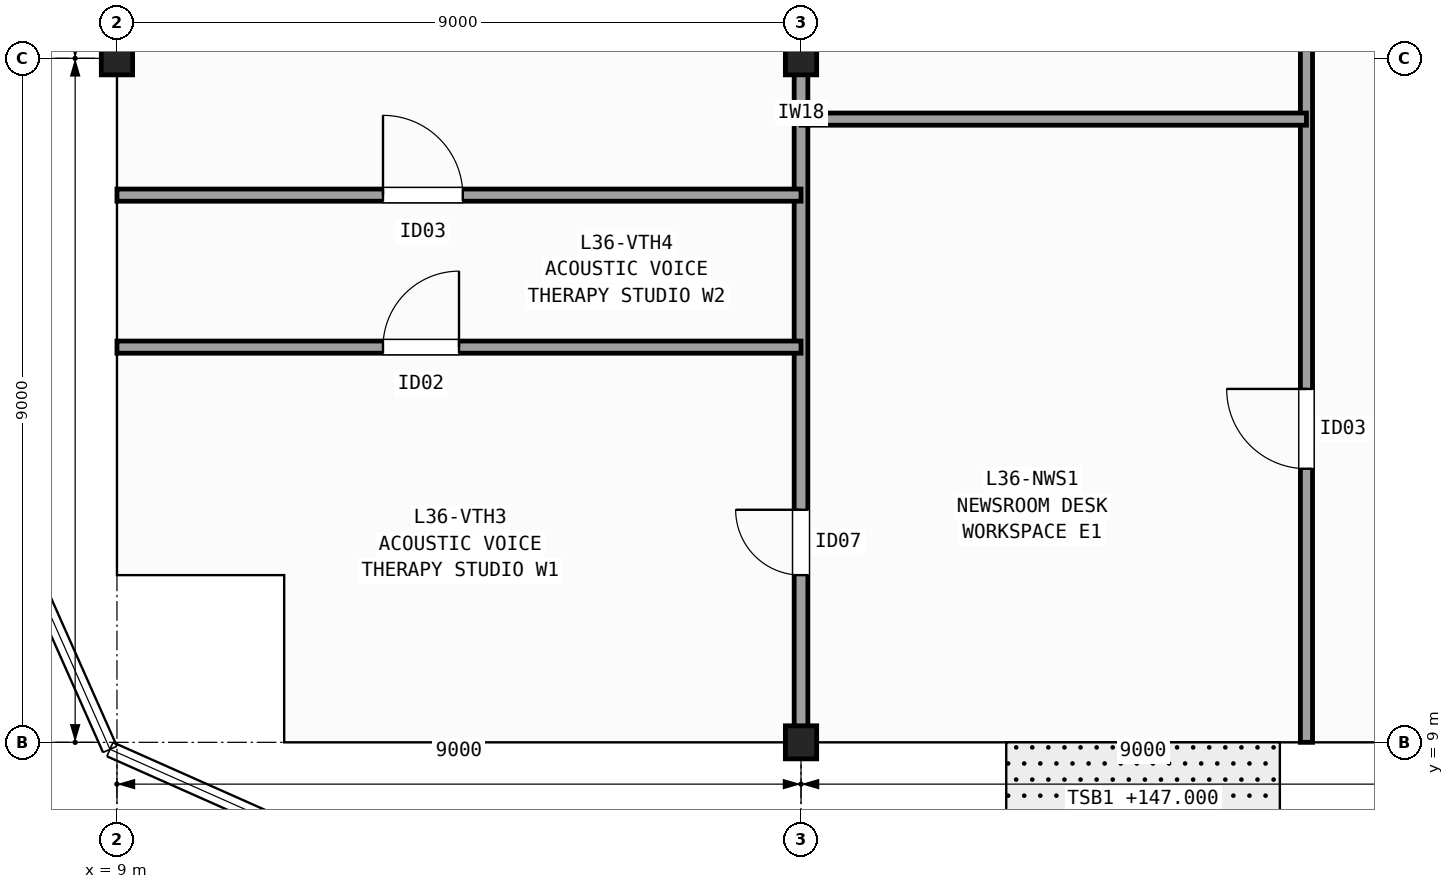
"""IFC4 building model, lengths in metres.
Left out: names, types, materials, properties, quantities, classifications, styles, units other than length and angle.
Written with IfcOpenShell. Run it as: python <this file> out.ifc"""

import sys

from ifc_helpers import new_model, si_unit, direction, frame, frame_2d, origin, origin_2d, place, context, subcontext, project, spatial, rectangle, i_section, extrude, element, fill, save


model = new_model("IFC4")
c1 = context("Model", 3, precision=1e-05, world=origin(), true_north=direction((0.0, 1.0)))
c2 = subcontext(c1, "Body", "Model", "MODEL_VIEW")
j1 = project(units=[si_unit("LENGTHUNIT", "METRE"), si_unit("PLANEANGLEUNIT", "RADIAN")], contexts=[c1])
p1 = place(None, origin())
s1 = spatial("IfcSite", under=j1, at=p1, CompositionType="ELEMENT")
p2 = place(p1, origin())
s2 = spatial("IfcBuilding", under=s1, at=p2, CompositionType="ELEMENT")
p3 = place(p2, frame((0.0, 0.0, 147.0)))
s3 = spatial("IfcBuildingStorey", under=s2, at=p3, CompositionType="ELEMENT", Elevation=147.0)
for number, where, z_axis, x_axis in (
    (1, (9.0, 18.0, 0.0), (0.0, 0.0, 1.0), (1.0, 0.0, 0.0)),
    (2, (18.0, 9.0, 0.0), (0.0, 0.0, 1.0), (1.0, 0.0, 0.0)),
    (3, (18.0, 18.0, 0.0), (0.0, 0.0, 1.0), (1.0, 0.0, 0.0)),
):
    element("IfcColumn", number, at=place(p3, frame(where, z_axis=z_axis, x_axis=x_axis)), inside=s3, PredefinedType="COLUMN", context=c2, shape_type="SweptSolid", body=[
        extrude(i_section(OverallWidth=0.412, OverallDepth=0.435, WebThickness=0.036, FlangeThickness=0.057, FilletRadius=0.015, at=origin_2d()), origin(), (0.0, 0.0, 1.0), 3.7),
    ])
p4 = place(p3, frame((24.65, 9.0, 0.0), z_axis=(0.0, 0.0, 1.0), x_axis=(0.0, 1.0, 0.0)))
e4 = element("IfcWall", 4, at=p4, inside=s3, PredefinedType="PARTITIONING", context=c2, shape_type="SweptSolid", body=[
    extrude(rectangle(XDim=19.2, YDim=0.16, at=frame_2d((9.6, 0.0))), origin(), (0.0, 0.0, 1.0), 2.634),
])
p5 = place(p4, frame((3.6, 0.0, 0.0)))
e5 = element("IfcOpeningElement", 5, at=p5, cuts=e4, PredefinedType="OPENING", context=c2, shape_type="SweptSolid", body=[
    extrude(rectangle(XDim=1.05, YDim=2.15, at=frame_2d((0.525, 1.075))), frame((0.0, 0.09, 0.0), z_axis=(0.0, -1.0, 0.0), x_axis=(1.0, 0.0, 0.0)), (0.0, 0.0, 1.0), 0.18),
])
p6 = place(p4, frame((13.165, 0.0, 0.0)))
e6 = element("IfcOpeningElement", 6, at=p6, cuts=e4, PredefinedType="OPENING", context=c2, shape_type="SweptSolid", body=[
    extrude(rectangle(XDim=1.2, YDim=2.15, at=frame_2d((0.6, 1.075))), frame((0.0, 0.09, 0.0), z_axis=(0.0, -1.0, 0.0), x_axis=(1.0, 0.0, 0.0)), (0.0, 0.0, 1.0), 0.18),
])
p7 = place(p3, frame((18.0, 9.0, 0.0), z_axis=(0.0, 0.0, 1.0), x_axis=(0.0, 1.0, 0.0)))
e7 = element("IfcWall", 7, at=p7, inside=s3, PredefinedType="PARTITIONING", context=c2, shape_type="SweptSolid", body=[
    extrude(rectangle(XDim=19.13, YDim=0.18, at=frame_2d((9.565, 0.0))), origin(), (0.0, 0.0, 1.0), 2.634),
])
p8 = place(p7, frame((2.2, 0.0, 0.0)))
e8 = element("IfcOpeningElement", 8, at=p8, cuts=e7, PredefinedType="OPENING", context=c2, shape_type="SweptSolid", body=[
    extrude(rectangle(XDim=0.86, YDim=2.05, at=frame_2d((0.43, 1.025))), frame((0.0, 0.1, 0.0), z_axis=(0.0, -1.0, 0.0), x_axis=(1.0, 0.0, 0.0)), (0.0, 0.0, 1.0), 0.2),
])
p9 = place(p7, frame((13.5, 0.0, 0.0)))
e9 = element("IfcOpeningElement", 9, at=p9, cuts=e7, PredefinedType="OPENING", context=c2, shape_type="SweptSolid", body=[
    extrude(rectangle(XDim=0.95, YDim=2.1, at=frame_2d((0.475, 1.05))), frame((0.0, 0.1, 0.0), z_axis=(0.0, -1.0, 0.0), x_axis=(1.0, 0.0, 0.0)), (0.0, 0.0, 1.0), 0.2),
])
p10 = place(p3, frame((18.0, 17.2, 0.0), z_axis=(0.0, 0.0, 1.0), x_axis=(1.0, 0.0, 0.0)))
e10 = element("IfcWall", 10, at=p10, inside=s3, PredefinedType="PARTITIONING", context=c2, shape_type="SweptSolid", body=[
    extrude(rectangle(XDim=6.65, YDim=0.16, at=frame_2d((3.325, 0.0))), origin(), (0.0, 0.0, 1.0), 2.789),
])
p11 = place(p3, frame((9.0, 14.2, 0.0), z_axis=(0.0, 0.0, 1.0), x_axis=(1.0, 0.0, 0.0)))
e11 = element("IfcWall", 11, at=p11, inside=s3, PredefinedType="PARTITIONING", context=c2, shape_type="SweptSolid", body=[
    extrude(rectangle(XDim=9.0, YDim=0.16, at=frame_2d((4.5, 0.0))), origin(), (0.0, 0.0, 1.0), 2.792),
])
p12 = place(p11, frame((3.5, 0.0, 0.0)))
e12 = element("IfcOpeningElement", 12, at=p12, cuts=e11, PredefinedType="OPENING", context=c2, shape_type="SweptSolid", body=[
    extrude(rectangle(XDim=1.0, YDim=2.1, at=frame_2d((0.5, 1.05))), frame((0.0, 0.09, 0.0), z_axis=(0.0, -1.0, 0.0), x_axis=(1.0, 0.0, 0.0)), (0.0, 0.0, 1.0), 0.18),
])
p13 = place(p3, frame((9.0, 16.2, 0.0), z_axis=(0.0, 0.0, 1.0), x_axis=(1.0, 0.0, 0.0)))
e13 = element("IfcWall", 13, at=p13, inside=s3, PredefinedType="PARTITIONING", context=c2, shape_type="SweptSolid", body=[
    extrude(rectangle(XDim=9.0, YDim=0.16, at=frame_2d((4.5, 0.0))), origin(), (0.0, 0.0, 1.0), 2.792),
])
p14 = place(p13, frame((3.5, 0.0, 0.0)))
e14 = element("IfcOpeningElement", 14, at=p14, cuts=e13, PredefinedType="OPENING", context=c2, shape_type="SweptSolid", body=[
    extrude(rectangle(XDim=1.05, YDim=2.15, at=frame_2d((0.525, 1.075))), frame((0.0, 0.09, 0.0), z_axis=(0.0, -1.0, 0.0), x_axis=(1.0, 0.0, 0.0)), (0.0, 0.0, 1.0), 0.18),
])
p15 = place(p5, origin())
e15 = element("IfcDoor", 15, at=p15, inside=s3, OperationType="SINGLE_SWING_RIGHT", PredefinedType="DOOR", context=c2, shape_type="SweptSolid", body=[
    extrude(rectangle(XDim=1.05, YDim=2.15, at=frame_2d((0.525, 1.075))), frame((0.0, 0.025, 0.0), z_axis=(0.0, -1.0, 0.0), x_axis=(1.0, 0.0, 0.0)), (0.0, 0.0, 1.0), 0.05),
])
fill(e5, e15)
p16 = place(p8, origin())
e16 = element("IfcDoor", 16, at=p16, inside=s3, OperationType="SINGLE_SWING_RIGHT", PredefinedType="DOOR", context=c2, shape_type="SweptSolid", body=[
    extrude(rectangle(XDim=0.86, YDim=2.05, at=frame_2d((0.43, 1.025))), frame((0.0, 0.025, 0.0), z_axis=(0.0, -1.0, 0.0), x_axis=(1.0, 0.0, 0.0)), (0.0, 0.0, 1.0), 0.05),
])
fill(e8, e16)
p17 = place(p12, origin())
e17 = element("IfcDoor", 17, at=p17, inside=s3, OperationType="SINGLE_SWING_RIGHT", PredefinedType="DOOR", context=c2, shape_type="SweptSolid", body=[
    extrude(rectangle(XDim=1.0, YDim=2.1, at=frame_2d((0.5, 1.05))), frame((0.0, 0.025, 0.0), z_axis=(0.0, -1.0, 0.0), x_axis=(1.0, 0.0, 0.0)), (0.0, 0.0, 1.0), 0.05),
])
fill(e12, e17)
p18 = place(p14, origin())
e18 = element("IfcDoor", 18, at=p18, inside=s3, OperationType="SINGLE_SWING_LEFT", PredefinedType="DOOR", context=c2, shape_type="SweptSolid", body=[
    extrude(rectangle(XDim=1.05, YDim=2.15, at=frame_2d((0.525, 1.075))), frame((0.0, 0.025, 0.0), z_axis=(0.0, -1.0, 0.0), x_axis=(1.0, 0.0, 0.0)), (0.0, 0.0, 1.0), 0.05),
])
fill(e14, e18)
save(model, sys.argv[1])
